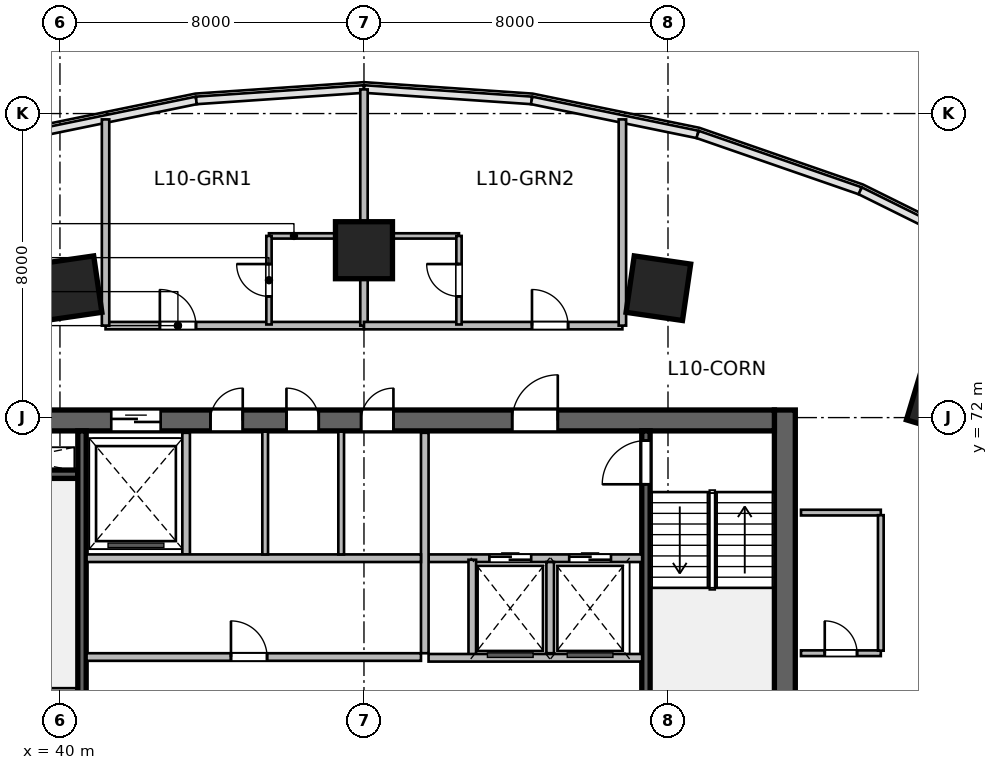
"""IFC4 building model, lengths in metres.
Left out: names, types, materials, properties, quantities, classifications, styles, units other than length and angle.
Written with IfcOpenShell. Run it as: python <this file> out.ifc"""

import sys

from ifc_helpers import new_model, si_unit, direction, frame, frame_2d, origin, origin_2d, place, context, subcontext, project, spatial, rectangle, extrude, source, transform, mapped, element, fill, save


model = new_model("IFC4")
c1 = context("Model", 3, precision=1e-05, world=origin(), true_north=direction((0.0, 1.0)))
c2 = subcontext(c1, "Body", "Model", "MODEL_VIEW")
j1 = project(units=[si_unit("LENGTHUNIT", "METRE"), si_unit("PLANEANGLEUNIT", "RADIAN")], contexts=[c1])
p1 = place(None, origin())
s1 = spatial("IfcSite", under=j1, at=p1, CompositionType="ELEMENT")
p2 = place(p1, origin())
s2 = spatial("IfcBuilding", under=s1, at=p2, CompositionType="ELEMENT")
p3 = place(p2, frame((0.0, 0.0, 49.8)))
s3 = spatial("IfcBuildingStorey", under=s2, at=p3, CompositionType="ELEMENT", Elevation=49.8)
m1 = source(origin(), c2, "Body", "SweptSolid", [
    extrude(rectangle(XDim=12.0, YDim=0.55, at=frame_2d((6.0, 0.0))), origin(), (0.0, 0.0, 1.0), 3.6),
])
p4 = place(p3, frame((59.075, 60.2, 0.0), z_axis=(0.0, 0.0, 1.0), x_axis=(0.0, 1.0, 0.0)))
e1 = element("IfcWall", 1, at=p4, inside=s3, PredefinedType="SHEAR", context=c2, shape_type="MappedRepresentation", body=[
    mapped(m1, transform((0.0, 0.0, 0.0), scale=1.0)),
])
m2 = source(origin(), c2, "Body", "SweptSolid", [
    extrude(rectangle(XDim=21.6, YDim=0.55, at=frame_2d((10.8, 0.0))), origin(), (0.0, 0.0, 1.0), 3.6),
])
p5 = place(p3, frame((37.2, 71.925, 0.0), z_axis=(0.0, 0.0, 1.0), x_axis=(1.0, 0.0, 0.0)))
e2 = element("IfcWall", 2, at=p5, inside=s3, PredefinedType="SHEAR", context=c2, shape_type="MappedRepresentation", body=[
    mapped(m2, transform((0.0, 0.0, 0.0), scale=1.0)),
])
p6 = place(p5, frame((1.2, 0.0, 0.0)))
e3 = element("IfcOpeningElement", 3, at=p6, cuts=e2, PredefinedType="OPENING", context=c2, shape_type="SweptSolid", body=[
    extrude(rectangle(XDim=0.9, YDim=2.1, at=frame_2d((0.45, 1.05))), frame((0.0, 0.285, 0.0), z_axis=(0.0, -1.0, 0.0), x_axis=(1.0, 0.0, 0.0)), (0.0, 0.0, 1.0), 0.57),
])
p7 = place(p5, frame((14.7, 0.0, 0.0)))
e4 = element("IfcOpeningElement", 4, at=p7, cuts=e2, PredefinedType="OPENING", context=c2, shape_type="SweptSolid", body=[
    extrude(rectangle(XDim=1.2, YDim=2.15, at=frame_2d((0.6, 1.075))), frame((0.0, 0.285, 0.0), z_axis=(0.0, -1.0, 0.0), x_axis=(1.0, 0.0, 0.0)), (0.0, 0.0, 1.0), 0.57),
])
p8 = place(p5, frame((4.15, 0.0, 0.0)))
e5 = element("IfcOpeningElement", 5, at=p8, cuts=e2, PredefinedType="OPENING", context=c2, shape_type="SweptSolid", body=[
    extrude(rectangle(XDim=1.3, YDim=2.15, at=frame_2d((0.65, 1.075))), frame((0.0, 0.285, 0.0), z_axis=(0.0, -1.0, 0.0), x_axis=(1.0, 0.0, 0.0)), (0.0, 0.0, 1.0), 0.57),
])
p9 = place(p5, frame((6.76, 0.0, 0.0)))
e6 = element("IfcOpeningElement", 6, at=p9, cuts=e2, PredefinedType="OPENING", context=c2, shape_type="SweptSolid", body=[
    extrude(rectangle(XDim=0.85, YDim=2.1, at=frame_2d((0.425, 1.05))), frame((0.0, 0.285, 0.0), z_axis=(0.0, -1.0, 0.0), x_axis=(1.0, 0.0, 0.0)), (0.0, 0.0, 1.0), 0.57),
])
p10 = place(p5, frame((8.76, 0.0, 0.0)))
e7 = element("IfcOpeningElement", 7, at=p10, cuts=e2, PredefinedType="OPENING", context=c2, shape_type="SweptSolid", body=[
    extrude(rectangle(XDim=0.85, YDim=2.1, at=frame_2d((0.425, 1.05))), frame((0.0, 0.285, 0.0), z_axis=(0.0, -1.0, 0.0), x_axis=(1.0, 0.0, 0.0)), (0.0, 0.0, 1.0), 0.57),
])
p11 = place(p5, frame((10.725, 0.0, 0.0)))
e8 = element("IfcOpeningElement", 8, at=p11, cuts=e2, PredefinedType="OPENING", context=c2, shape_type="SweptSolid", body=[
    extrude(rectangle(XDim=0.85, YDim=2.1, at=frame_2d((0.425, 1.05))), frame((0.0, 0.285, 0.0), z_axis=(0.0, -1.0, 0.0), x_axis=(1.0, 0.0, 0.0)), (0.0, 0.0, 1.0), 0.57),
])
m3 = source(origin(), c2, "Body", "SweptSolid", [
    extrude(rectangle(XDim=3.27, YDim=0.22, at=frame_2d((1.635, 0.0))), origin(), (0.0, 0.0, 1.0), 3.6),
])
p12 = place(p3, frame((37.2, 70.51, 0.0), z_axis=(0.0, 0.0, 1.0), x_axis=(1.0, 0.0, 0.0)))
e9 = element("IfcWall", 9, at=p12, inside=s3, PredefinedType="SHEAR", context=c2, shape_type="MappedRepresentation", body=[
    mapped(m3, transform((0.0, 0.0, 0.0), scale=1.0)),
])
m4 = source(origin(), c2, "Body", "SweptSolid", [
    extrude(rectangle(XDim=10.9, YDim=0.22, at=frame_2d((5.45, 0.0))), origin(), (0.0, 0.0, 1.0), 3.6),
])
p13 = place(p3, frame((40.58, 60.75, 0.0), z_axis=(0.0, 0.0, 1.0), x_axis=(0.0, 1.0, 0.0)))
e10 = element("IfcWall", 10, at=p13, inside=s3, PredefinedType="SHEAR", context=c2, shape_type="MappedRepresentation", body=[
    mapped(m4, transform((0.0, 0.0, 0.0), scale=1.0)),
])
p14 = place(p3, frame((55.42, 60.75, 0.0), z_axis=(0.0, 0.0, 1.0), x_axis=(0.0, 1.0, 0.0)))
e11 = element("IfcWall", 11, at=p14, inside=s3, PredefinedType="SHEAR", context=c2, shape_type="MappedRepresentation", body=[
    mapped(m4, transform((0.0, 0.0, 0.0), scale=1.0)),
])
p15 = place(p14, frame((9.495, 0.0, 0.0)))
e12 = element("IfcOpeningElement", 12, at=p15, cuts=e11, PredefinedType="OPENING", context=c2, shape_type="SweptSolid", body=[
    extrude(rectangle(XDim=1.15, YDim=2.15, at=frame_2d((0.575, 1.075))), frame((0.0, 0.12, 0.0), z_axis=(0.0, -1.0, 0.0), x_axis=(1.0, 0.0, 0.0)), (0.0, 0.0, 1.0), 0.24),
])
m5 = source(origin(), c2, "Body", "SweptSolid", [
    extrude(rectangle(XDim=1.5, YDim=1.5, at=origin_2d()), origin(), (0.0, 0.0, 1.0), 3.6),
])
for number, where, z_axis, x_axis in (
    (13, (40.253, 75.404, 0.0), (0.0, 0.0, 1.0), (-0.143, 0.99, 0.0)),
    (14, (48.0, 76.404, 0.0), (0.0, 0.0, 1.0), (0.0, 1.0, 0.0)),
    (15, (55.747, 75.404, 0.0), (0.0, 0.0, 1.0), (0.143, 0.99, 0.0)),
    (16, (63.209, 72.442, 0.0), (0.0, 0.0, 1.0), (0.289, 0.957, 0.0)),
):
    element("IfcColumn", number, at=place(p3, frame(where, z_axis=z_axis, x_axis=x_axis)), inside=s3, PredefinedType="COLUMN", context=c2, shape_type="MappedRepresentation", body=[
        mapped(m5, transform((0.0, 0.0, 0.0), scale=1.0)),
    ])
m6 = source(origin(), c2, "Body", "SweptSolid", [
    extrude(rectangle(XDim=5.62, YDim=0.2, at=frame_2d((2.81, 0.0))), origin(), (0.0, 0.0, 1.0), 3.36),
])
p16 = place(p3, frame((49.7, 68.3, 0.0), z_axis=(0.0, 0.0, 1.0), x_axis=(1.0, 0.0, 0.0)))
e17 = element("IfcWall", 17, at=p16, inside=s3, PredefinedType="SOLIDWALL", context=c2, shape_type="MappedRepresentation", body=[
    mapped(m6, transform((0.0, 0.0, 0.0), scale=1.0)),
])
p17 = place(p16, frame((1.6, 0.0, 0.0)))
e18 = element("IfcOpeningElement", 18, at=p17, cuts=e17, PredefinedType="OPENING", context=c2, shape_type="SweptSolid", body=[
    extrude(rectangle(XDim=1.1, YDim=2.15, at=frame_2d((0.55, 1.075))), frame((0.0, 0.11, 0.0), z_axis=(0.0, -1.0, 0.0), x_axis=(1.0, 0.0, 0.0)), (0.0, 0.0, 1.0), 0.22),
])
p18 = place(p16, frame((3.7, 0.0, 0.0)))
e19 = element("IfcOpeningElement", 19, at=p18, cuts=e17, PredefinedType="OPENING", context=c2, shape_type="SweptSolid", body=[
    extrude(rectangle(XDim=1.1, YDim=2.15, at=frame_2d((0.55, 1.075))), frame((0.0, 0.11, 0.0), z_axis=(0.0, -1.0, 0.0), x_axis=(1.0, 0.0, 0.0)), (0.0, 0.0, 1.0), 0.22),
])
m7 = source(origin(), c2, "Body", "SweptSolid", [
    extrude(rectangle(XDim=5.8, YDim=0.2, at=frame_2d((2.9, 0.0))), origin(), (0.0, 0.0, 1.0), 3.36),
])
p19 = place(p3, frame((49.6, 65.8, 0.0), z_axis=(0.0, 0.0, 1.0), x_axis=(0.0, 1.0, 0.0)))
e20 = element("IfcWall", 20, at=p19, inside=s3, PredefinedType="SOLIDWALL", context=c2, shape_type="MappedRepresentation", body=[
    mapped(m7, transform((0.0, 0.0, 0.0), scale=1.0)),
])
m8 = source(origin(), c2, "Body", "SweptSolid", [
    extrude(rectangle(XDim=2.58, YDim=0.2, at=frame_2d((1.29, 0.0))), origin(), (0.0, 0.0, 1.0), 3.36),
])
p20 = place(p3, frame((50.85, 65.68, 0.0), z_axis=(0.0, 0.0, 1.0), x_axis=(0.0, 1.0, 0.0)))
e21 = element("IfcWall", 21, at=p20, inside=s3, PredefinedType="SOLIDWALL", context=c2, shape_type="MappedRepresentation", body=[
    mapped(m8, transform((0.0, 0.0, 0.0), scale=1.0)),
])
m9 = source(origin(), c2, "Body", "SweptSolid", [
    extrude(rectangle(XDim=2.4, YDim=0.2, at=frame_2d((1.2, 0.0))), origin(), (0.0, 0.0, 1.0), 3.36),
])
p21 = place(p3, frame((52.9, 65.8, 0.0), z_axis=(0.0, 0.0, 1.0), x_axis=(0.0, 1.0, 0.0)))
e22 = element("IfcWall", 22, at=p21, inside=s3, PredefinedType="SOLIDWALL", context=c2, shape_type="MappedRepresentation", body=[
    mapped(m9, transform((0.0, 0.0, 0.0), scale=1.0)),
])
p22 = place(p3, frame((49.7, 65.68, 0.0), z_axis=(0.0, 0.0, 1.0), x_axis=(1.0, 0.0, 0.0)))
e23 = element("IfcWall", 23, at=p22, inside=s3, PredefinedType="SOLIDWALL", context=c2, shape_type="MappedRepresentation", body=[
    mapped(m6, transform((0.0, 0.0, 0.0), scale=1.0)),
])
m10 = source(origin(), c2, "Body", "SweptSolid", [
    extrude(rectangle(XDim=3.2, YDim=0.2, at=frame_2d((1.6, 0.0))), origin(), (0.0, 0.0, 1.0), 3.36),
])
p23 = place(p3, frame((43.32, 68.4, 0.0), z_axis=(0.0, 0.0, 1.0), x_axis=(0.0, 1.0, 0.0)))
e24 = element("IfcWall", 24, at=p23, inside=s3, PredefinedType="SOLIDWALL", context=c2, shape_type="MappedRepresentation", body=[
    mapped(m10, transform((0.0, 0.0, 0.0), scale=1.0)),
])
m11 = source(origin(), c2, "Body", "SweptSolid", [
    extrude(rectangle(XDim=8.8, YDim=0.2, at=frame_2d((4.4, 0.0))), origin(), (0.0, 0.0, 1.0), 3.36),
])
p24 = place(p3, frame((40.7, 68.3, 0.0), z_axis=(0.0, 0.0, 1.0), x_axis=(1.0, 0.0, 0.0)))
e25 = element("IfcWall", 25, at=p24, inside=s3, PredefinedType="SOLIDWALL", context=c2, shape_type="MappedRepresentation", body=[
    mapped(m11, transform((0.0, 0.0, 0.0), scale=1.0)),
])
m12 = source(origin(), c2, "Body", "SweptSolid", [
    extrude(rectangle(XDim=3.23, YDim=0.15, at=frame_2d((1.615, 0.0))), origin(), (0.0, 0.0, 1.0), 3.36),
])
for number, where, z_axis, x_axis in (
    (26, (45.4, 68.4, 0.0), (0.0, 0.0, 1.0), (0.0, 1.0, 0.0)),
    (27, (47.4, 68.4, 0.0), (0.0, 0.0, 1.0), (0.0, 1.0, 0.0)),
):
    element("IfcWall", number, at=place(p3, frame(where, z_axis=z_axis, x_axis=x_axis)), inside=s3, PredefinedType="PARTITIONING", context=c2, shape_type="MappedRepresentation", body=[
        mapped(m12, transform((0.0, 0.0, 0.0), scale=1.0)),
    ])
p25 = place(p3, frame((40.7, 65.7, 0.0), z_axis=(0.0, 0.0, 1.0), x_axis=(1.0, 0.0, 0.0)))
e28 = element("IfcWall", 28, at=p25, inside=s3, PredefinedType="SOLIDWALL", context=c2, shape_type="MappedRepresentation", body=[
    mapped(m11, transform((0.0, 0.0, 0.0), scale=1.0)),
])
p26 = place(p25, frame((3.8, 0.0, 0.0)))
e29 = element("IfcOpeningElement", 29, at=p26, cuts=e28, PredefinedType="OPENING", context=c2, shape_type="SweptSolid", body=[
    extrude(rectangle(XDim=0.95, YDim=2.15, at=frame_2d((0.475, 1.075))), frame((0.0, 0.11, 0.0), z_axis=(0.0, -1.0, 0.0), x_axis=(1.0, 0.0, 0.0)), (0.0, 0.0, 1.0), 0.22),
])
m13 = source(origin(), c2, "Body", "SweptSolid", [
    extrude(rectangle(XDim=2.1, YDim=0.15, at=frame_2d((1.05, 0.0))), origin(), (0.0, 0.0, 1.0), 3.36),
])
p27 = place(p3, frame((59.5, 65.8, 0.0), z_axis=(0.0, 0.0, 1.0), x_axis=(1.0, 0.0, 0.0)))
e30 = element("IfcWall", 30, at=p27, inside=s3, PredefinedType="PARTITIONING", context=c2, shape_type="MappedRepresentation", body=[
    mapped(m13, transform((0.0, 0.0, 0.0), scale=1.0)),
])
p28 = place(p27, frame((0.625, 0.0, 0.0)))
e31 = element("IfcOpeningElement", 31, at=p28, cuts=e30, PredefinedType="OPENING", context=c2, shape_type="SweptSolid", body=[
    extrude(rectangle(XDim=0.85, YDim=2.1, at=frame_2d((0.425, 1.05))), frame((0.0, 0.085, 0.0), z_axis=(0.0, -1.0, 0.0), x_axis=(1.0, 0.0, 0.0)), (0.0, 0.0, 1.0), 0.17),
])
p29 = place(p3, frame((59.5, 69.5, 0.0), z_axis=(0.0, 0.0, 1.0), x_axis=(1.0, 0.0, 0.0)))
e32 = element("IfcWall", 32, at=p29, inside=s3, PredefinedType="PARTITIONING", context=c2, shape_type="MappedRepresentation", body=[
    mapped(m13, transform((0.0, 0.0, 0.0), scale=1.0)),
])
m14 = source(origin(), c2, "Body", "SweptSolid", [
    extrude(rectangle(XDim=3.565, YDim=0.15, at=frame_2d((1.783, 0.0))), origin(), (0.0, 0.0, 1.0), 3.36),
])
p30 = place(p3, frame((61.6, 65.867, 0.0), z_axis=(0.0, 0.0, 1.0), x_axis=(0.0, 1.0, 0.0)))
e33 = element("IfcWall", 33, at=p30, inside=s3, PredefinedType="PARTITIONING", context=c2, shape_type="MappedRepresentation", body=[
    mapped(m14, transform((0.0, 0.0, 0.0), scale=1.0)),
])
m15 = source(origin(), c2, "Body", "SweptSolid", [
    extrude(rectangle(XDim=6.8, YDim=0.195, at=frame_2d((3.4, 0.0))), origin(), (0.0, 0.0, 1.0), 3.36),
])
p31 = place(p3, frame((41.2, 74.42, 0.0), z_axis=(0.0, 0.0, 1.0), x_axis=(1.0, 0.0, 0.0)))
e34 = element("IfcWall", 34, at=p31, inside=s3, PredefinedType="PARTITIONING", context=c2, shape_type="MappedRepresentation", body=[
    mapped(m15, transform((0.0, 0.0, 0.0), scale=1.0)),
])
p32 = place(p31, frame((1.429, 0.0, 0.0)))
e35 = element("IfcOpeningElement", 35, at=p32, cuts=e34, PredefinedType="OPENING", context=c2, shape_type="SweptSolid", body=[
    extrude(rectangle(XDim=0.95, YDim=2.15, at=frame_2d((0.475, 1.075))), frame((0.0, 0.107, 0.0), z_axis=(0.0, -1.0, 0.0), x_axis=(1.0, 0.0, 0.0)), (0.0, 0.0, 1.0), 0.215),
])
m16 = source(origin(), c2, "Body", "SweptSolid", [
    extrude(rectangle(XDim=6.216, YDim=0.195, at=frame_2d((3.108, 0.0))), origin(), (0.0, 0.0, 1.0), 2.644),
])
p33 = place(p3, frame((48.0, 74.42, 0.0), z_axis=(0.0, 0.0, 1.0), x_axis=(0.0, 1.0, 0.0)))
e36 = element("IfcWall", 36, at=p33, inside=s3, PredefinedType="PARTITIONING", context=c2, shape_type="MappedRepresentation", body=[
    mapped(m16, transform((0.0, 0.0, 0.0), scale=1.0)),
])
m17 = source(origin(), c2, "Body", "SweptSolid", [
    extrude(rectangle(XDim=5.426, YDim=0.195, at=frame_2d((2.713, 0.0))), origin(), (0.0, 0.0, 1.0), 3.36),
])
p34 = place(p3, frame((41.2, 74.42, 0.0), z_axis=(0.0, 0.0, 1.0), x_axis=(0.0, 1.0, 0.0)))
e37 = element("IfcWall", 37, at=p34, inside=s3, PredefinedType="PARTITIONING", context=c2, shape_type="MappedRepresentation", body=[
    mapped(m17, transform((0.0, 0.0, 0.0), scale=1.0)),
])
m18 = source(origin(), c2, "Body", "SweptSolid", [
    extrude(rectangle(XDim=2.35, YDim=0.14, at=frame_2d((1.175, 0.0))), origin(), (0.0, 0.0, 1.0), 3.36),
])
p35 = place(p3, frame((45.5, 76.78, 0.0), z_axis=(0.0, 0.0, 1.0), x_axis=(1.0, 0.0, 0.0)))
e38 = element("IfcWall", 38, at=p35, inside=s3, PredefinedType="PARTITIONING", context=c2, shape_type="MappedRepresentation", body=[
    mapped(m18, transform((0.0, 0.0, 0.0), scale=1.0)),
])
m19 = source(origin(), c2, "Body", "SweptSolid", [
    extrude(rectangle(XDim=2.33, YDim=0.14, at=frame_2d((1.165, 0.0))), origin(), (0.0, 0.0, 1.0), 3.36),
])
p36 = place(p3, frame((45.5, 74.45, 0.0), z_axis=(0.0, 0.0, 1.0), x_axis=(0.0, 1.0, 0.0)))
e39 = element("IfcWall", 39, at=p36, inside=s3, PredefinedType="PARTITIONING", context=c2, shape_type="MappedRepresentation", body=[
    mapped(m19, transform((0.0, 0.0, 0.0), scale=1.0)),
])
p37 = place(p36, frame((0.74, 0.0, 0.0)))
e40 = element("IfcOpeningElement", 40, at=p37, cuts=e39, PredefinedType="OPENING", context=c2, shape_type="SweptSolid", body=[
    extrude(rectangle(XDim=0.85, YDim=2.05, at=frame_2d((0.425, 1.025))), frame((0.0, 0.08, 0.0), z_axis=(0.0, -1.0, 0.0), x_axis=(1.0, 0.0, 0.0)), (0.0, 0.0, 1.0), 0.16),
])
p38 = place(p3, frame((48.0, 74.42, 0.0), z_axis=(0.0, 0.0, 1.0), x_axis=(1.0, 0.0, 0.0)))
e41 = element("IfcWall", 41, at=p38, inside=s3, PredefinedType="PARTITIONING", context=c2, shape_type="MappedRepresentation", body=[
    mapped(m15, transform((0.0, 0.0, 0.0), scale=1.0)),
])
p39 = place(p38, frame((4.421, 0.0, 0.0)))
e42 = element("IfcOpeningElement", 42, at=p39, cuts=e41, PredefinedType="OPENING", context=c2, shape_type="SweptSolid", body=[
    extrude(rectangle(XDim=0.95, YDim=2.15, at=frame_2d((0.475, 1.075))), frame((0.0, 0.107, 0.0), z_axis=(0.0, -1.0, 0.0), x_axis=(1.0, 0.0, 0.0)), (0.0, 0.0, 1.0), 0.215),
])
p40 = place(p3, frame((54.8, 74.42, 0.0), z_axis=(0.0, 0.0, 1.0), x_axis=(0.0, 1.0, 0.0)))
e43 = element("IfcWall", 43, at=p40, inside=s3, PredefinedType="PARTITIONING", context=c2, shape_type="MappedRepresentation", body=[
    mapped(m17, transform((0.0, 0.0, 0.0), scale=1.0)),
])
p41 = place(p3, frame((48.15, 76.78, 0.0), z_axis=(0.0, 0.0, 1.0), x_axis=(1.0, 0.0, 0.0)))
e44 = element("IfcWall", 44, at=p41, inside=s3, PredefinedType="PARTITIONING", context=c2, shape_type="MappedRepresentation", body=[
    mapped(m18, transform((0.0, 0.0, 0.0), scale=1.0)),
])
p42 = place(p3, frame((50.5, 74.45, 0.0), z_axis=(0.0, 0.0, 1.0), x_axis=(0.0, 1.0, 0.0)))
e45 = element("IfcWall", 45, at=p42, inside=s3, PredefinedType="PARTITIONING", context=c2, shape_type="MappedRepresentation", body=[
    mapped(m19, transform((0.0, 0.0, 0.0), scale=1.0)),
])
p43 = place(p42, frame((0.74, 0.0, 0.0)))
e46 = element("IfcOpeningElement", 46, at=p43, cuts=e45, PredefinedType="OPENING", context=c2, shape_type="SweptSolid", body=[
    extrude(rectangle(XDim=0.85, YDim=2.05, at=frame_2d((0.425, 1.025))), frame((0.0, 0.08, 0.0), z_axis=(0.0, -1.0, 0.0), x_axis=(1.0, 0.0, 0.0)), (0.0, 0.0, 1.0), 0.16),
])
m20 = source(origin(), c2, "Body", "SweptSolid", [
    extrude(rectangle(XDim=1.15, YDim=2.15, at=frame_2d((0.575, 1.075))), frame((0.0, 0.025, 0.0), z_axis=(0.0, -1.0, 0.0), x_axis=(1.0, 0.0, 0.0)), (0.0, 0.0, 1.0), 0.05),
])
p44 = place(p15, origin())
e47 = element("IfcDoor", 47, at=p44, inside=s3, OperationType="SINGLE_SWING_LEFT", PredefinedType="DOOR", context=c2, shape_type="MappedRepresentation", body=[
    mapped(m20, transform((0.0, 0.0, 0.0), scale=1.0)),
])
fill(e12, e47)
m21 = source(origin(), c2, "Body", "SweptSolid", [
    extrude(rectangle(XDim=1.2, YDim=2.15, at=frame_2d((0.6, 1.075))), frame((0.0, 0.025, 0.0), z_axis=(0.0, -1.0, 0.0), x_axis=(1.0, 0.0, 0.0)), (0.0, 0.0, 1.0), 0.05),
])
p45 = place(p7, origin())
e48 = element("IfcDoor", 48, at=p45, inside=s3, OperationType="SINGLE_SWING_RIGHT", PredefinedType="DOOR", context=c2, shape_type="MappedRepresentation", body=[
    mapped(m21, transform((0.0, 0.0, 0.0), scale=1.0)),
])
fill(e4, e48)
m22 = source(origin(), c2, "Body", "SweptSolid", [
    extrude(rectangle(XDim=1.1, YDim=2.15, at=frame_2d((0.55, 1.075))), frame((0.0, 0.025, 0.0), z_axis=(0.0, -1.0, 0.0), x_axis=(1.0, 0.0, 0.0)), (0.0, 0.0, 1.0), 0.05),
])
p46 = place(p17, origin())
e49 = element("IfcDoor", 49, at=p46, inside=s3, OperationType="DOUBLE_DOOR_SLIDING", PredefinedType="DOOR", context=c2, shape_type="MappedRepresentation", body=[
    mapped(m22, transform((0.0, 0.0, 0.0), scale=1.0)),
])
fill(e18, e49)
p47 = place(p18, origin())
e50 = element("IfcDoor", 50, at=p47, inside=s3, OperationType="DOUBLE_DOOR_SLIDING", PredefinedType="DOOR", context=c2, shape_type="MappedRepresentation", body=[
    mapped(m22, transform((0.0, 0.0, 0.0), scale=1.0)),
])
fill(e19, e50)
m23 = source(origin(), c2, "Body", "SweptSolid", [
    extrude(rectangle(XDim=1.3, YDim=2.15, at=frame_2d((0.65, 1.075))), frame((0.0, 0.025, 0.0), z_axis=(0.0, -1.0, 0.0), x_axis=(1.0, 0.0, 0.0)), (0.0, 0.0, 1.0), 0.05),
])
p48 = place(p8, origin())
e51 = element("IfcDoor", 51, at=p48, inside=s3, OperationType="DOUBLE_DOOR_SLIDING", PredefinedType="DOOR", context=c2, shape_type="MappedRepresentation", body=[
    mapped(m23, transform((0.0, 0.0, 0.0), scale=1.0)),
])
fill(e5, e51)
m24 = source(origin(), c2, "Body", "SweptSolid", [
    extrude(rectangle(XDim=0.85, YDim=2.1, at=frame_2d((0.425, 1.05))), frame((0.0, 0.025, 0.0), z_axis=(0.0, -1.0, 0.0), x_axis=(1.0, 0.0, 0.0)), (0.0, 0.0, 1.0), 0.05),
])
p49 = place(p9, origin())
e52 = element("IfcDoor", 52, at=p49, inside=s3, OperationType="SINGLE_SWING_RIGHT", PredefinedType="DOOR", context=c2, shape_type="MappedRepresentation", body=[
    mapped(m24, transform((0.0, 0.0, 0.0), scale=1.0)),
])
fill(e6, e52)
p50 = place(p10, origin())
e53 = element("IfcDoor", 53, at=p50, inside=s3, OperationType="SINGLE_SWING_LEFT", PredefinedType="DOOR", context=c2, shape_type="MappedRepresentation", body=[
    mapped(m24, transform((0.0, 0.0, 0.0), scale=1.0)),
])
fill(e7, e53)
p51 = place(p11, origin())
e54 = element("IfcDoor", 54, at=p51, inside=s3, OperationType="SINGLE_SWING_RIGHT", PredefinedType="DOOR", context=c2, shape_type="MappedRepresentation", body=[
    mapped(m24, transform((0.0, 0.0, 0.0), scale=1.0)),
])
fill(e8, e54)
m25 = source(origin(), c2, "Body", "SweptSolid", [
    extrude(rectangle(XDim=0.95, YDim=2.15, at=frame_2d((0.475, 1.075))), frame((0.0, 0.025, 0.0), z_axis=(0.0, -1.0, 0.0), x_axis=(1.0, 0.0, 0.0)), (0.0, 0.0, 1.0), 0.05),
])
p52 = place(p26, origin())
e55 = element("IfcDoor", 55, at=p52, inside=s3, OperationType="SINGLE_SWING_LEFT", PredefinedType="DOOR", context=c2, shape_type="MappedRepresentation", body=[
    mapped(m25, transform((0.0, 0.0, 0.0), scale=1.0)),
])
fill(e29, e55)
p53 = place(p28, origin())
e56 = element("IfcDoor", 56, at=p53, inside=s3, OperationType="SINGLE_SWING_LEFT", PredefinedType="DOOR", context=c2, shape_type="MappedRepresentation", body=[
    mapped(m24, transform((0.0, 0.0, 0.0), scale=1.0)),
])
fill(e31, e56)
p54 = place(p32, origin())
e57 = element("IfcDoor", 57, at=p54, inside=s3, OperationType="SINGLE_SWING_LEFT", PredefinedType="DOOR", context=c2, shape_type="MappedRepresentation", body=[
    mapped(m25, transform((0.0, 0.0, 0.0), scale=1.0)),
])
fill(e35, e57)
m26 = source(origin(), c2, "Body", "SweptSolid", [
    extrude(rectangle(XDim=0.85, YDim=2.05, at=frame_2d((0.425, 1.025))), frame((0.0, 0.025, 0.0), z_axis=(0.0, -1.0, 0.0), x_axis=(1.0, 0.0, 0.0)), (0.0, 0.0, 1.0), 0.05),
])
p55 = place(p37, origin())
e58 = element("IfcDoor", 58, at=p55, inside=s3, OperationType="SINGLE_SWING_RIGHT", PredefinedType="DOOR", context=c2, shape_type="MappedRepresentation", body=[
    mapped(m26, transform((0.0, 0.0, 0.0), scale=1.0)),
])
fill(e40, e58)
p56 = place(p39, origin())
e59 = element("IfcDoor", 59, at=p56, inside=s3, OperationType="SINGLE_SWING_LEFT", PredefinedType="DOOR", context=c2, shape_type="MappedRepresentation", body=[
    mapped(m25, transform((0.0, 0.0, 0.0), scale=1.0)),
])
fill(e42, e59)
p57 = place(p43, origin())
e60 = element("IfcDoor", 60, at=p57, inside=s3, OperationType="SINGLE_SWING_RIGHT", PredefinedType="DOOR", context=c2, shape_type="MappedRepresentation", body=[
    mapped(m26, transform((0.0, 0.0, 0.0), scale=1.0)),
])
fill(e46, e60)
save(model, sys.argv[1])
